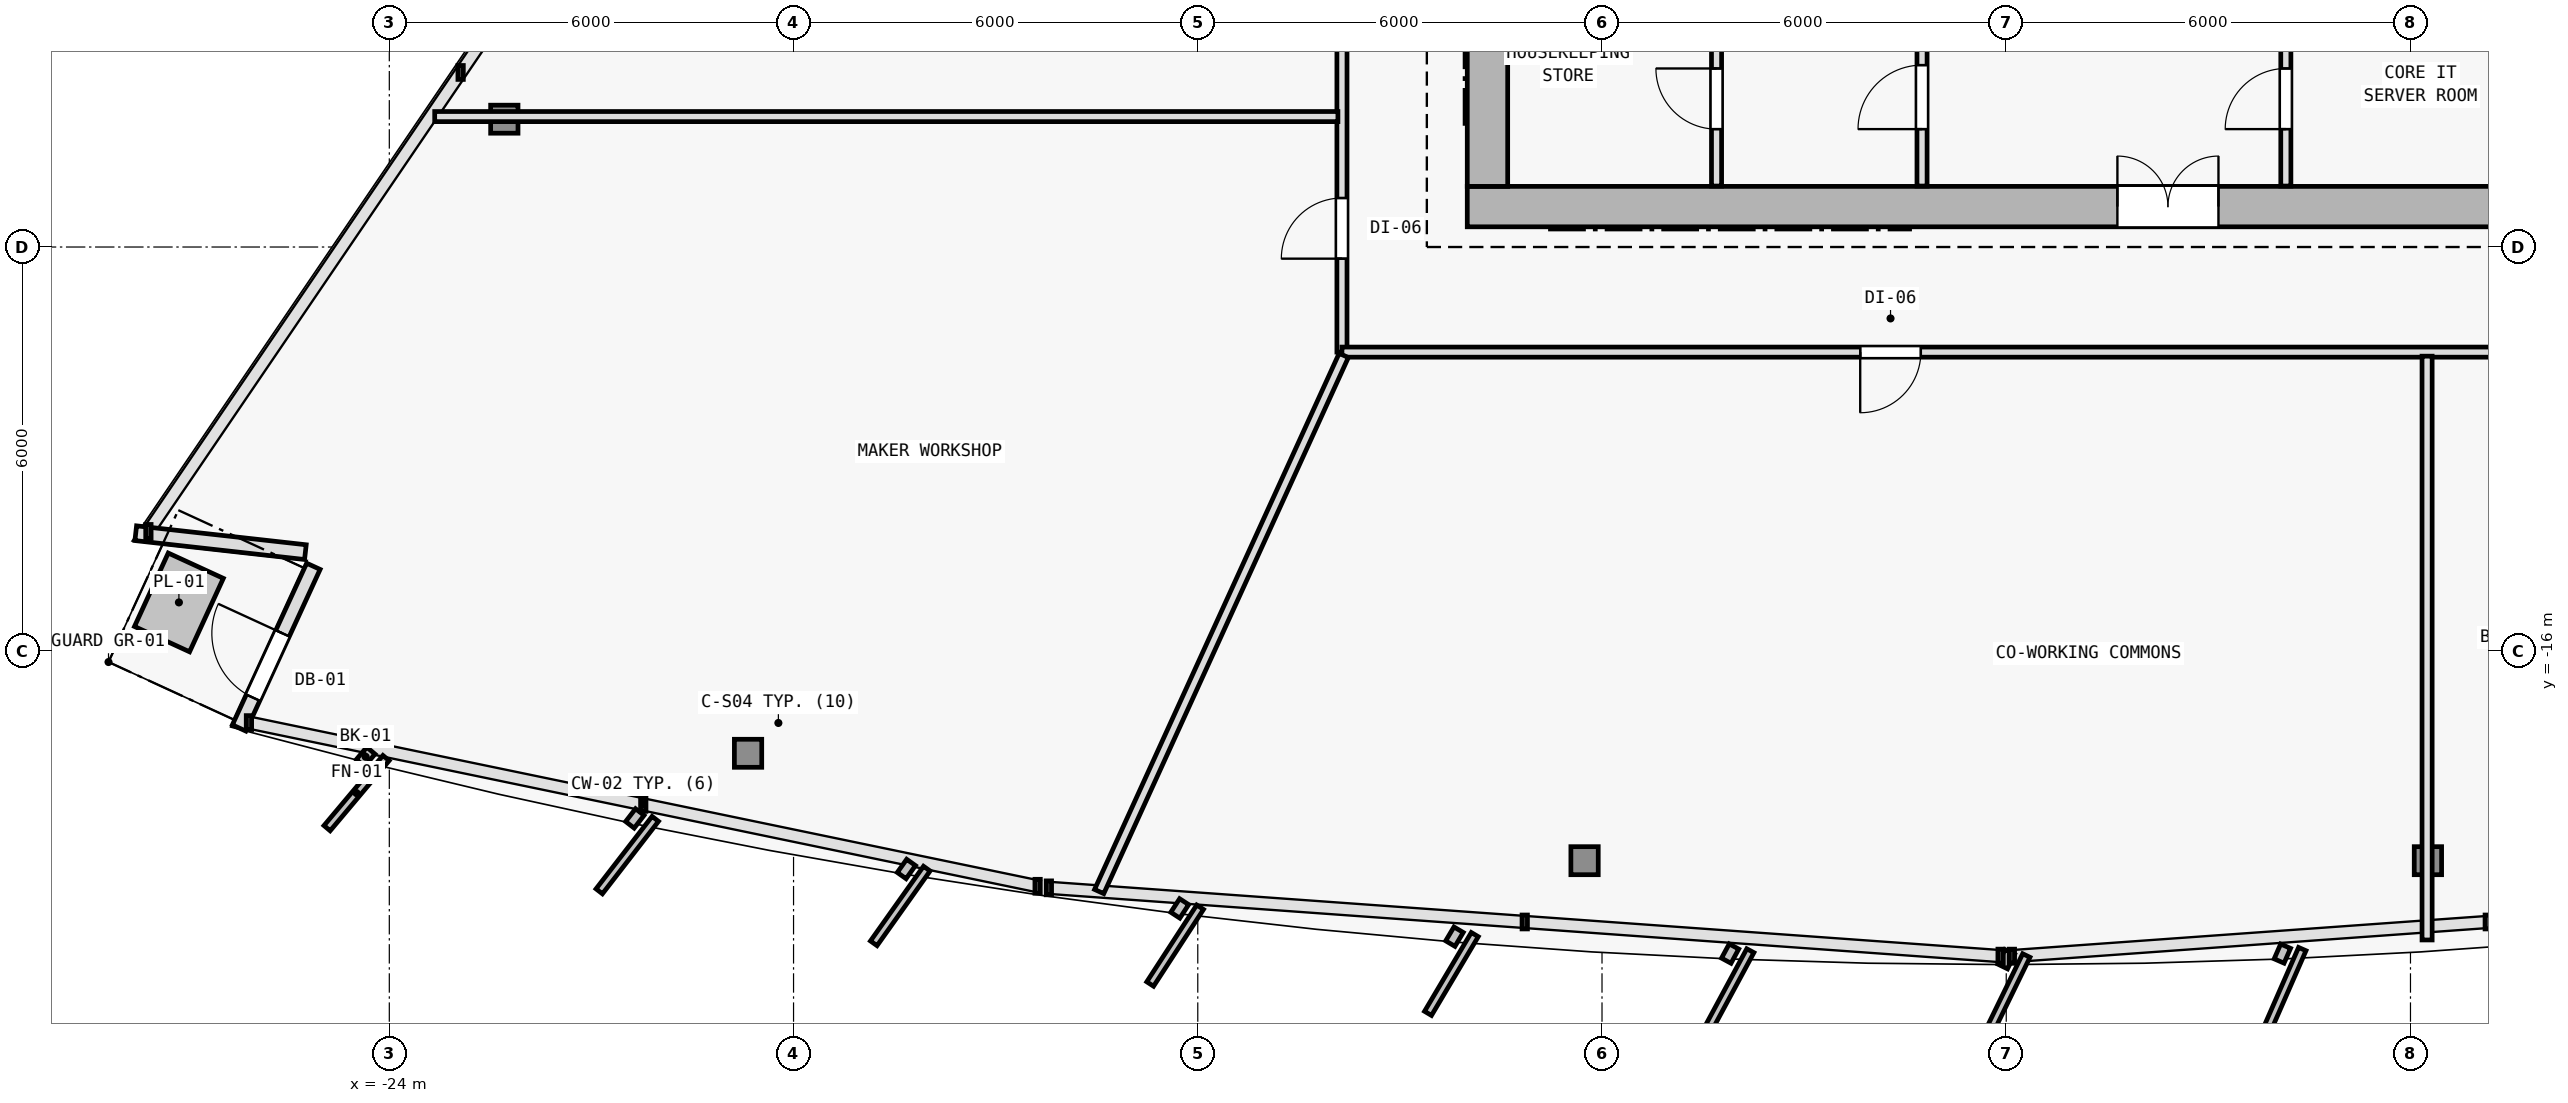
"""IFC4 building model, lengths in metres.
Left out: names, types, materials, properties, quantities, classifications, styles, units other than length and angle.
Written with IfcOpenShell. Run it as: python <this file> out.ifc"""

import sys

from ifc_helpers import new_model, si_unit, direction, frame, frame_2d, origin, origin_2d, place, context, subcontext, project, spatial, rectangle, i_section, extrude, element, fill, save


model = new_model("IFC4")
c1 = context("Model", 3, precision=1e-05, world=origin(), true_north=direction((0.0, 1.0)))
c2 = subcontext(c1, "Body", "Model", "MODEL_VIEW")
j1 = project(units=[si_unit("LENGTHUNIT", "METRE"), si_unit("PLANEANGLEUNIT", "RADIAN")], contexts=[c1])
p1 = place(None, origin())
s1 = spatial("IfcSite", under=j1, at=p1, CompositionType="ELEMENT")
p2 = place(p1, origin())
s2 = spatial("IfcBuilding", under=s1, at=p2, CompositionType="ELEMENT")
p3 = place(p2, frame((0.0, 0.0, 111.3)))
s3 = spatial("IfcBuildingStorey", under=s2, at=p3, CompositionType="ELEMENT", Elevation=111.3)
for number, where, z_axis, x_axis in (
    (1, (-7.7, -9.4, 0.0), (0.0, 0.0, 1.0), (1.0, 0.0, 0.0)),
    (2, (0.0, -9.4, 0.0), (0.0, 0.0, 1.0), (1.0, 0.0, 0.0)),
):
    element("IfcColumn", number, at=place(p3, frame(where, z_axis=z_axis, x_axis=x_axis)), inside=s3, PredefinedType="COLUMN", context=c2, shape_type="SweptSolid", body=[
        extrude(i_section(OverallWidth=0.409, OverallDepth=0.425, WebThickness=0.021, FlangeThickness=0.034, FilletRadius=0.015, at=origin_2d()), origin(), (0.0, 0.0, 1.0), 3.6),
    ])
p4 = place(p3, frame((-18.675, -17.514, 0.005), z_axis=(0.020594847032, 0.03357707734, 0.999223914922), x_axis=(-0.852427604955, 0.522845271865, 0.0)))
e3 = element("IfcColumn", 3, at=p4, inside=s3, PredefinedType="COLUMN", context=c2, shape_type="SweptSolid", body=[
    extrude(i_section(OverallWidth=0.406, OverallDepth=0.416, WebThickness=0.019, FlangeThickness=0.031, FilletRadius=0.015, at=origin_2d()), origin(), (0.0, 0.0, 1.0), 3.592),
])
for number, where, z_axis, x_axis in (
    (4, (-6.259, -19.108, 0.005), (0.007, 0.035, 0.999), (-0.981, 0.193, 0.0)),
    (5, (6.259, -19.108, 0.005), (-0.007, 0.035, 0.999), (-0.981, -0.193, 0.0)),
):
    element("IfcColumn", number, at=place(p3, frame(where, z_axis=z_axis, x_axis=x_axis)), inside=s3, PredefinedType="COLUMN", context=c2, shape_type="SweptSolid", body=[
        extrude(i_section(OverallWidth=0.406, OverallDepth=0.416, WebThickness=0.019, FlangeThickness=0.031, FilletRadius=0.015, at=origin_2d()), origin(), (0.0, 0.0, 1.0), 3.592),
    ])
p5 = place(p3, frame((-22.293, -8.103, 0.005), z_axis=(0.025222449659, 0.021619242565, 0.999448065876), x_axis=(-0.650791373456, 0.759256602365, 0.0)))
e6 = element("IfcColumn", 6, at=p5, inside=s3, PredefinedType="COLUMN", context=c2, shape_type="SweptSolid", body=[
    extrude(i_section(OverallWidth=0.406, OverallDepth=0.416, WebThickness=0.019, FlangeThickness=0.031, FilletRadius=0.015, at=origin_2d()), origin(), (0.0, 0.0, 1.0), 3.591),
])
p6 = place(p3, frame((-25.246, -14.529, 0.0), z_axis=(0.0, 0.0, 1.0), x_axis=(-0.993831926713, 0.110896805395, 0.0)))
e7 = element("IfcWall", 7, at=p6, inside=s3, PredefinedType="SOLIDWALL", context=c2, shape_type="SweptSolid", body=[
    extrude(rectangle(XDim=2.534, YDim=0.22, at=frame_2d((1.267, 0.0))), origin(), (0.0, 0.0, 1.0), 3.35),
])
p7 = place(p3, frame((-26.229, -17.139, 0.0), z_axis=(0.0, 0.0, 1.0), x_axis=(0.417498108462, 0.908677791866, 0.0)))
e8 = element("IfcWall", 8, at=p7, inside=s3, PredefinedType="SOLIDWALL", context=c2, shape_type="SweptSolid", body=[
    extrude(rectangle(XDim=2.641, YDim=0.22, at=frame_2d((1.32, 0.0))), origin(), (0.0, 0.0, 1.0), 3.35),
])
p8 = place(p7, frame((0.495, 0.0, 0.0)))
e9 = element("IfcOpeningElement", 9, at=p8, cuts=e8, PredefinedType="OPENING", context=c2, shape_type="SweptSolid", body=[
    extrude(rectangle(XDim=1.05, YDim=2.15, at=frame_2d((0.525, 1.075))), frame((0.0, 0.12, 0.0), z_axis=(0.0, -1.0, 0.0), x_axis=(1.0, 0.0, 0.0)), (0.0, 0.0, 1.0), 0.24),
])
p9 = place(p3, frame((-8.0, -9.4, 0.0), z_axis=(0.0, 0.0, 1.0), x_axis=(1.0, 0.0, 0.0)))
e10 = element("IfcWall", 10, at=p9, inside=s3, PredefinedType="SHEAR", context=c2, shape_type="SweptSolid", body=[
    extrude(rectangle(XDim=16.0, YDim=0.6, at=frame_2d((8.0, 0.0))), origin(), (0.0, 0.0, 1.0), 3.35),
])
p10 = place(p9, frame((9.65, 0.0, 0.0)))
e11 = element("IfcOpeningElement", 11, at=p10, cuts=e10, PredefinedType="OPENING", context=c2, shape_type="SweptSolid", body=[
    extrude(rectangle(XDim=1.5, YDim=2.2, at=frame_2d((0.75, 1.1))), frame((0.0, 0.31, 0.0), z_axis=(0.0, -1.0, 0.0), x_axis=(1.0, 0.0, 0.0)), (0.0, 0.0, 1.0), 0.62),
])
p11 = place(p3, frame((-7.7, -9.1, 0.0), z_axis=(0.0, 0.0, 1.0), x_axis=(0.0, 1.0, 0.0)))
e12 = element("IfcWall", 12, at=p11, inside=s3, PredefinedType="SHEAR", context=c2, shape_type="SweptSolid", body=[
    extrude(rectangle(XDim=19.0, YDim=0.6, at=frame_2d((9.5, 0.0))), origin(), (0.0, 0.0, 1.0), 3.35),
])
p12 = place(p11, frame((12.65, 0.0, 0.0)))
e13 = element("IfcOpeningElement", 13, at=p12, cuts=e12, PredefinedType="OPENING", context=c2, shape_type="SweptSolid", body=[
    extrude(rectangle(XDim=1.1, YDim=2.15, at=frame_2d((0.55, 1.075))), frame((0.0, 0.31, 0.0), z_axis=(0.0, -1.0, 0.0), x_axis=(1.0, 0.0, 0.0)), (0.0, 0.0, 1.0), 0.62),
])
p13 = place(p3, frame((-1.25, -9.095, 0.0), z_axis=(0.0, 0.0, 1.0), x_axis=(0.0, 1.0, 0.0)))
e14 = element("IfcWall", 14, at=p13, inside=s3, PredefinedType="PARTITIONING", context=c2, shape_type="SweptSolid", body=[
    extrude(rectangle(XDim=3.045, YDim=0.15, at=frame_2d((1.522, 0.0))), origin(), (0.0, 0.0, 1.0), 3.35),
])
p14 = place(p13, frame((0.845, 0.0, 0.0)))
e15 = element("IfcOpeningElement", 15, at=p14, cuts=e14, PredefinedType="OPENING", context=c2, shape_type="SweptSolid", body=[
    extrude(rectangle(XDim=0.95, YDim=2.1, at=frame_2d((0.475, 1.05))), frame((0.0, 0.085, 0.0), z_axis=(0.0, -1.0, 0.0), x_axis=(1.0, 0.0, 0.0)), (0.0, 0.0, 1.0), 0.17),
])
p15 = place(p3, frame((4.15, -9.095, 0.0), z_axis=(0.0, 0.0, 1.0), x_axis=(0.0, 1.0, 0.0)))
e16 = element("IfcWall", 16, at=p15, inside=s3, PredefinedType="PARTITIONING", context=c2, shape_type="SweptSolid", body=[
    extrude(rectangle(XDim=3.045, YDim=0.15, at=frame_2d((1.522, 0.0))), origin(), (0.0, 0.0, 1.0), 3.35),
])
p16 = place(p15, frame((0.845, 0.0, 0.0)))
e17 = element("IfcOpeningElement", 17, at=p16, cuts=e16, PredefinedType="OPENING", context=c2, shape_type="SweptSolid", body=[
    extrude(rectangle(XDim=0.9, YDim=2.1, at=frame_2d((0.45, 1.05))), frame((0.0, 0.085, 0.0), z_axis=(0.0, -1.0, 0.0), x_axis=(1.0, 0.0, 0.0)), (0.0, 0.0, 1.0), 0.17),
])
p17 = place(p3, frame((-4.3, -9.095, 0.0), z_axis=(0.0, 0.0, 1.0), x_axis=(0.0, 1.0, 0.0)))
e18 = element("IfcWall", 18, at=p17, inside=s3, PredefinedType="PARTITIONING", context=c2, shape_type="SweptSolid", body=[
    extrude(rectangle(XDim=3.045, YDim=0.15, at=frame_2d((1.522, 0.0))), origin(), (0.0, 0.0, 1.0), 3.35),
])
p18 = place(p17, frame((0.845, 0.0, 0.0)))
e19 = element("IfcOpeningElement", 19, at=p18, cuts=e18, PredefinedType="OPENING", context=c2, shape_type="SweptSolid", body=[
    extrude(rectangle(XDim=0.9, YDim=2.1, at=frame_2d((0.45, 1.05))), frame((0.0, 0.085, 0.0), z_axis=(0.0, -1.0, 0.0), x_axis=(1.0, 0.0, 0.0)), (0.0, 0.0, 1.0), 0.17),
])
p19 = place(p3, frame((-9.86, -11.56, 0.0), z_axis=(0.0, 0.0, 1.0), x_axis=(0.0, 1.0, 0.0)))
e20 = element("IfcWall", 20, at=p19, inside=s3, PredefinedType="PARTITIONING", context=c2, shape_type="SweptSolid", body=[
    extrude(rectangle(XDim=19.986, YDim=0.15, at=frame_2d((9.993, 0.0))), origin(), (0.0, 0.0, 1.0), 2.705),
])
p20 = place(p19, frame((7.148, 0.0, 0.0)))
e21 = element("IfcOpeningElement", 21, at=p20, cuts=e20, PredefinedType="OPENING", context=c2, shape_type="SweptSolid", body=[
    extrude(rectangle(XDim=0.9, YDim=2.1, at=frame_2d((0.45, 1.05))), frame((0.0, 0.085, 0.0), z_axis=(0.0, -1.0, 0.0), x_axis=(1.0, 0.0, 0.0)), (0.0, 0.0, 1.0), 0.17),
])
p21 = place(p19, frame((1.387, 0.0, 0.0)))
e22 = element("IfcOpeningElement", 22, at=p21, cuts=e20, PredefinedType="OPENING", context=c2, shape_type="SweptSolid", body=[
    extrude(rectangle(XDim=0.9, YDim=2.1, at=frame_2d((0.45, 1.05))), frame((0.0, 0.085, 0.0), z_axis=(0.0, -1.0, 0.0), x_axis=(1.0, 0.0, 0.0)), (0.0, 0.0, 1.0), 0.17),
])
p22 = place(p3, frame((13.18, -11.56, 0.0), z_axis=(0.0, 0.0, 1.0), x_axis=(-1.0, 0.0, 0.0)))
e23 = element("IfcWall", 23, at=p22, inside=s3, PredefinedType="PARTITIONING", context=c2, shape_type="SweptSolid", body=[
    extrude(rectangle(XDim=23.04, YDim=0.15, at=frame_2d((11.52, 0.0))), origin(), (0.0, 0.0, 1.0), 2.775),
])
p23 = place(p22, frame((14.448, 0.0, 0.0)))
e24 = element("IfcOpeningElement", 24, at=p23, cuts=e23, PredefinedType="OPENING", context=c2, shape_type="SweptSolid", body=[
    extrude(rectangle(XDim=0.9, YDim=2.1, at=frame_2d((0.45, 1.05))), frame((0.0, 0.085, 0.0), z_axis=(0.0, -1.0, 0.0), x_axis=(1.0, 0.0, 0.0)), (0.0, 0.0, 1.0), 0.17),
])
p24 = place(p22, frame((5.083, 0.0, 0.0)))
e25 = element("IfcOpeningElement", 25, at=p24, cuts=e23, PredefinedType="OPENING", context=c2, shape_type="SweptSolid", body=[
    extrude(rectangle(XDim=0.9, YDim=2.1, at=frame_2d((0.45, 1.05))), frame((0.0, 0.085, 0.0), z_axis=(0.0, -1.0, 0.0), x_axis=(1.0, 0.0, 0.0)), (0.0, 0.0, 1.0), 0.17),
])
p25 = place(p22, frame((2.451, 0.0, 0.0)))
e26 = element("IfcOpeningElement", 26, at=p25, cuts=e23, PredefinedType="OPENING", context=c2, shape_type="SweptSolid", body=[
    extrude(rectangle(XDim=0.9, YDim=2.1, at=frame_2d((0.45, 1.05))), frame((0.0, 0.085, 0.0), z_axis=(0.0, -1.0, 0.0), x_axis=(1.0, 0.0, 0.0)), (0.0, 0.0, 1.0), 0.17),
])
p26 = place(p22, frame((0.473, 0.0, 0.0)))
e27 = element("IfcOpeningElement", 27, at=p26, cuts=e23, PredefinedType="OPENING", context=c2, shape_type="SweptSolid", body=[
    extrude(rectangle(XDim=0.85, YDim=2.1, at=frame_2d((0.425, 1.05))), frame((0.0, 0.085, 0.0), z_axis=(0.0, -1.0, 0.0), x_axis=(1.0, 0.0, 0.0)), (0.0, 0.0, 1.0), 0.17),
])
p27 = place(p3, frame((6.247, -11.62, 0.0), z_axis=(0.0, 0.0, 1.0), x_axis=(0.0, -1.0, 0.0)))
e28 = element("IfcWall", 28, at=p27, inside=s3, PredefinedType="PARTITIONING", context=c2, shape_type="SweptSolid", body=[
    extrude(rectangle(XDim=8.665, YDim=0.15, at=frame_2d((4.333, 0.0))), origin(), (0.0, 0.0, 1.0), 2.775),
])
p28 = place(p3, frame((-9.92, -8.064, 0.0), z_axis=(0.0, 0.0, 1.0), x_axis=(-1.0, 0.0, 0.0)))
e29 = element("IfcWall", 29, at=p28, inside=s3, PredefinedType="PARTITIONING", context=c2, shape_type="SweptSolid", body=[
    extrude(rectangle(XDim=13.406, YDim=0.15, at=frame_2d((6.703, 0.0))), origin(), (0.0, 0.0, 1.0), 2.705),
])
p29 = place(p3, frame((-9.833, -11.609, 0.0), z_axis=(0.0, 0.0, 1.0), x_axis=(-0.415051797371, -0.909797782751, 0.0)))
e30 = element("IfcWall", 30, at=p29, inside=s3, PredefinedType="PARTITIONING", context=c2, shape_type="SweptSolid", body=[
    extrude(rectangle(XDim=8.746, YDim=0.15, at=frame_2d((4.373, 0.0))), origin(), (0.0, 0.0, 1.0), 2.835),
])
p30 = place(p8, origin())
e31 = element("IfcDoor", 31, at=p30, inside=s3, OperationType="SINGLE_SWING_RIGHT", PredefinedType="DOOR", context=c2, shape_type="SweptSolid", body=[
    extrude(rectangle(XDim=1.05, YDim=2.15, at=frame_2d((0.525, 1.075))), frame((0.0, 0.025, 0.0), z_axis=(0.0, -1.0, 0.0), x_axis=(1.0, 0.0, 0.0)), (0.0, 0.0, 1.0), 0.05),
])
fill(e9, e31)
p31 = place(p10, origin())
e32 = element("IfcDoor", 32, at=p31, inside=s3, OperationType="DOUBLE_DOOR_SINGLE_SWING", PredefinedType="DOOR", context=c2, shape_type="SweptSolid", body=[
    extrude(rectangle(XDim=1.5, YDim=2.2, at=frame_2d((0.75, 1.1))), frame((0.0, 0.025, 0.0), z_axis=(0.0, -1.0, 0.0), x_axis=(1.0, 0.0, 0.0)), (0.0, 0.0, 1.0), 0.05),
])
fill(e11, e32)
p32 = place(p14, origin())
e33 = element("IfcDoor", 33, at=p32, inside=s3, OperationType="SINGLE_SWING_LEFT", PredefinedType="DOOR", context=c2, shape_type="SweptSolid", body=[
    extrude(rectangle(XDim=0.95, YDim=2.1, at=frame_2d((0.475, 1.05))), frame((0.0, 0.025, 0.0), z_axis=(0.0, -1.0, 0.0), x_axis=(1.0, 0.0, 0.0)), (0.0, 0.0, 1.0), 0.05),
])
fill(e15, e33)
p33 = place(p18, origin())
e34 = element("IfcDoor", 34, at=p33, inside=s3, OperationType="SINGLE_SWING_RIGHT", PredefinedType="DOOR", context=c2, shape_type="SweptSolid", body=[
    extrude(rectangle(XDim=0.9, YDim=2.1, at=frame_2d((0.45, 1.05))), frame((0.0, 0.025, 0.0), z_axis=(0.0, -1.0, 0.0), x_axis=(1.0, 0.0, 0.0)), (0.0, 0.0, 1.0), 0.05),
])
fill(e19, e34)
p34 = place(p16, origin())
e35 = element("IfcDoor", 35, at=p34, inside=s3, OperationType="SINGLE_SWING_LEFT", PredefinedType="DOOR", context=c2, shape_type="SweptSolid", body=[
    extrude(rectangle(XDim=0.9, YDim=2.1, at=frame_2d((0.45, 1.05))), frame((0.0, 0.025, 0.0), z_axis=(0.0, -1.0, 0.0), x_axis=(1.0, 0.0, 0.0)), (0.0, 0.0, 1.0), 0.05),
])
fill(e17, e35)
p35 = place(p21, origin())
e36 = element("IfcDoor", 36, at=p35, inside=s3, OperationType="SINGLE_SWING_LEFT", PredefinedType="DOOR", context=c2, shape_type="SweptSolid", body=[
    extrude(rectangle(XDim=0.9, YDim=2.1, at=frame_2d((0.45, 1.05))), frame((0.0, 0.025, 0.0), z_axis=(0.0, -1.0, 0.0), x_axis=(1.0, 0.0, 0.0)), (0.0, 0.0, 1.0), 0.05),
])
fill(e22, e36)
p36 = place(p23, origin())
e37 = element("IfcDoor", 37, at=p36, inside=s3, OperationType="SINGLE_SWING_RIGHT", PredefinedType="DOOR", context=c2, shape_type="SweptSolid", body=[
    extrude(rectangle(XDim=0.9, YDim=2.1, at=frame_2d((0.45, 1.05))), frame((0.0, 0.025, 0.0), z_axis=(0.0, -1.0, 0.0), x_axis=(1.0, 0.0, 0.0)), (0.0, 0.0, 1.0), 0.05),
])
fill(e24, e37)
save(model, sys.argv[1])
